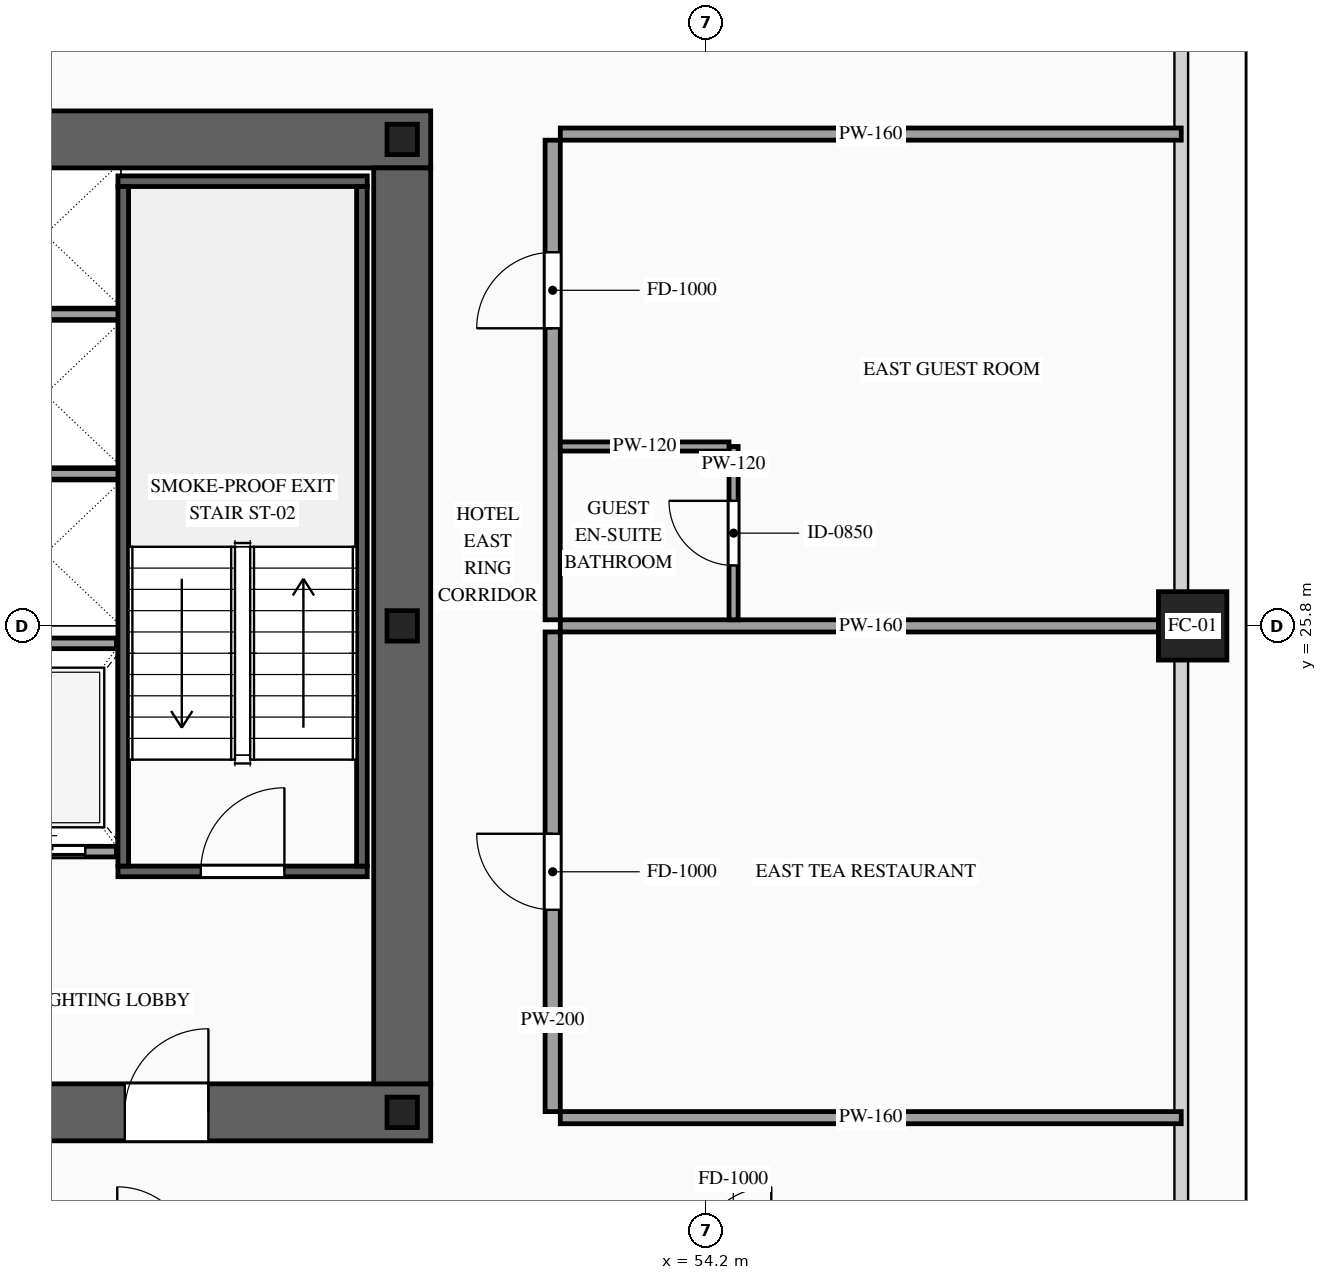
"""IFC4 building model, lengths in metres.
Left out: names, types, materials, properties, quantities, classifications, styles, units other than length and angle.
Written with IfcOpenShell. Run it as: python <this file> out.ifc"""

import sys

from ifc_helpers import new_model, si_unit, direction, frame, frame_2d, origin, origin_2d, place, context, subcontext, project, spatial, rectangle, hollow_rectangle, i_section, extrude, source, transform, mapped, element, fill, save


model = new_model("IFC4")
c1 = context("Model", 3, precision=1e-05, world=origin(), true_north=direction((0.0, 1.0)))
c2 = subcontext(c1, "Body", "Model", "MODEL_VIEW")
j1 = project(units=[si_unit("LENGTHUNIT", "METRE"), si_unit("PLANEANGLEUNIT", "RADIAN")], contexts=[c1])
p1 = place(None, origin())
s1 = spatial("IfcSite", under=j1, at=p1, CompositionType="ELEMENT")
p2 = place(p1, origin())
s2 = spatial("IfcBuilding", under=s1, at=p2, CompositionType="ELEMENT")
p3 = place(p2, frame((0.0, 0.0, 152.4)))
s3 = spatial("IfcBuildingStorey", under=s2, at=p3, CompositionType="ELEMENT", Elevation=152.4)
p4 = place(p3, frame((23.425, 19.4, 0.0), z_axis=(0.0, 0.0, 1.0), x_axis=(1.0, 0.0, 0.0)))
e1 = element("IfcWall", 1, at=p4, inside=s3, PredefinedType="SHEAR", context=c2, shape_type="SweptSolid", body=[
    extrude(rectangle(XDim=27.15, YDim=0.75, at=frame_2d((13.575, 0.0))), origin(), (0.0, 0.0, 1.0), 3.6),
])
p5 = place(p4, frame((2.025, 0.0, 0.0)))
e2 = element("IfcOpeningElement", 2, at=p5, cuts=e1, PredefinedType="OPENING", context=c2, shape_type="SweptSolid", body=[
    extrude(rectangle(XDim=1.1, YDim=2.2, at=frame_2d((0.55, 1.1))), frame((0.0, 0.39, 0.0), z_axis=(0.0, -1.0, 0.0), x_axis=(1.0, 0.0, 0.0)), (0.0, 0.0, 1.0), 0.78),
])
p6 = place(p4, frame((9.925, 0.0, 0.0)))
e3 = element("IfcOpeningElement", 3, at=p6, cuts=e1, PredefinedType="OPENING", context=c2, shape_type="SweptSolid", body=[
    extrude(rectangle(XDim=1.1, YDim=2.2, at=frame_2d((0.55, 1.1))), frame((0.0, 0.39, 0.0), z_axis=(0.0, -1.0, 0.0), x_axis=(1.0, 0.0, 0.0)), (0.0, 0.0, 1.0), 0.78),
])
p7 = place(p4, frame((23.125, 0.0, 0.0)))
e4 = element("IfcOpeningElement", 4, at=p7, cuts=e1, PredefinedType="OPENING", context=c2, shape_type="SweptSolid", body=[
    extrude(rectangle(XDim=1.1, YDim=2.2, at=frame_2d((0.55, 1.1))), frame((0.0, 0.39, 0.0), z_axis=(0.0, -1.0, 0.0), x_axis=(1.0, 0.0, 0.0)), (0.0, 0.0, 1.0), 0.78),
])
p8 = place(p4, frame((19.745, 0.0, 0.0)))
e5 = element("IfcOpeningElement", 5, at=p8, cuts=e1, PredefinedType="OPENING", context=c2, shape_type="SweptSolid", body=[
    extrude(rectangle(XDim=0.9, YDim=2.15, at=frame_2d((0.45, 1.075))), frame((0.0, 0.39, 0.0), z_axis=(0.0, -1.0, 0.0), x_axis=(1.0, 0.0, 0.0)), (0.0, 0.0, 1.0), 0.78),
])
p9 = place(p4, frame((18.305, 0.0, 0.0)))
e6 = element("IfcOpeningElement", 6, at=p9, cuts=e1, PredefinedType="OPENING", context=c2, shape_type="SweptSolid", body=[
    extrude(rectangle(XDim=0.9, YDim=2.15, at=frame_2d((0.45, 1.075))), frame((0.0, 0.39, 0.0), z_axis=(0.0, -1.0, 0.0), x_axis=(1.0, 0.0, 0.0)), (0.0, 0.0, 1.0), 0.78),
])
p10 = place(p3, frame((23.425, 32.2, 0.0), z_axis=(0.0, 0.0, 1.0), x_axis=(1.0, 0.0, 0.0)))
e7 = element("IfcWall", 7, at=p10, inside=s3, PredefinedType="SHEAR", context=c2, shape_type="SweptSolid", body=[
    extrude(rectangle(XDim=27.15, YDim=0.75, at=frame_2d((13.575, 0.0))), origin(), (0.0, 0.0, 1.0), 3.6),
])
p11 = place(p10, frame((4.645, 0.0, 0.0)))
e8 = element("IfcOpeningElement", 8, at=p11, cuts=e7, PredefinedType="OPENING", context=c2, shape_type="SweptSolid", body=[
    extrude(rectangle(XDim=0.9, YDim=2.15, at=frame_2d((0.45, 1.075))), frame((0.0, 0.39, 0.0), z_axis=(0.0, -1.0, 0.0), x_axis=(1.0, 0.0, 0.0)), (0.0, 0.0, 1.0), 0.78),
])
p12 = place(p10, frame((9.925, 0.0, 0.0)))
e9 = element("IfcOpeningElement", 9, at=p12, cuts=e7, PredefinedType="OPENING", context=c2, shape_type="SweptSolid", body=[
    extrude(rectangle(XDim=1.1, YDim=2.2, at=frame_2d((0.55, 1.1))), frame((0.0, 0.39, 0.0), z_axis=(0.0, -1.0, 0.0), x_axis=(1.0, 0.0, 0.0)), (0.0, 0.0, 1.0), 0.78),
])
p13 = place(p10, frame((15.775, 0.0, 0.0)))
e10 = element("IfcOpeningElement", 10, at=p13, cuts=e7, PredefinedType="OPENING", context=c2, shape_type="SweptSolid", body=[
    extrude(rectangle(XDim=1.1, YDim=2.2, at=frame_2d((0.55, 1.1))), frame((0.0, 0.39, 0.0), z_axis=(0.0, -1.0, 0.0), x_axis=(1.0, 0.0, 0.0)), (0.0, 0.0, 1.0), 0.78),
])
p14 = place(p10, frame((19.745, 0.0, 0.0)))
e11 = element("IfcOpeningElement", 11, at=p14, cuts=e7, PredefinedType="OPENING", context=c2, shape_type="SweptSolid", body=[
    extrude(rectangle(XDim=0.9, YDim=2.15, at=frame_2d((0.45, 1.075))), frame((0.0, 0.39, 0.0), z_axis=(0.0, -1.0, 0.0), x_axis=(1.0, 0.0, 0.0)), (0.0, 0.0, 1.0), 0.78),
])
m1 = source(origin(), c2, "Body", "SweptSolid", [
    extrude(rectangle(XDim=12.05, YDim=0.75, at=frame_2d((6.025, 0.0))), origin(), (0.0, 0.0, 1.0), 3.6),
])
p15 = place(p3, frame((50.2, 19.775, 0.0), z_axis=(0.0, 0.0, 1.0), x_axis=(0.0, 1.0, 0.0)))
e12 = element("IfcWall", 12, at=p15, inside=s3, PredefinedType="SHEAR", context=c2, shape_type="MappedRepresentation", body=[
    mapped(m1, transform((0.0, 0.0, 0.0), scale=1.0)),
])
m2 = source(origin(), c2, "Body", "SweptSolid", [
    extrude(i_section(OverallWidth=0.4, OverallDepth=0.4, WebThickness=0.013, FlangeThickness=0.021, at=origin_2d()), origin(), (0.0, 0.0, 1.0), 3.6),
])
for number, where, z_axis, x_axis in (
    (13, (50.2, 19.4, 0.0), (0.0, 0.0, 1.0), (1.0, 0.0, 0.0)),
    (14, (50.2, 25.8, 0.0), (0.0, 0.0, 1.0), (1.0, 0.0, 0.0)),
    (15, (50.2, 32.2, 0.0), (0.0, 0.0, 1.0), (1.0, 0.0, 0.0)),
):
    element("IfcColumn", number, at=place(p3, frame(where, z_axis=z_axis, x_axis=x_axis)), inside=s3, PredefinedType="COLUMN", context=c2, shape_type="MappedRepresentation", body=[
        mapped(m2, transform((0.0, 0.0, 0.0), scale=1.0)),
    ])
m3 = source(origin(), c2, "Body", "SweptSolid", [
    extrude(hollow_rectangle(XDim=0.9, YDim=0.9, WallThickness=0.042, at=origin_2d()), origin(), (0.0, 0.0, 1.0), 3.6),
])
p16 = place(p3, frame((60.6, 25.8, 0.0), z_axis=(0.0, 0.0, 1.0), x_axis=(1.0, 0.0, 0.0)))
e16 = element("IfcColumn", 16, at=p16, inside=s3, PredefinedType="COLUMN", context=c2, shape_type="MappedRepresentation", body=[
    mapped(m3, transform((0.0, 0.0, 0.0), scale=1.0)),
])
p17 = place(p3, frame((44.52, 22.83, 0.0), z_axis=(0.0, 0.0, 1.0), x_axis=(1.0, 0.0, 0.0)))
e17 = element("IfcWall", 17, at=p17, inside=s3, PredefinedType="SOLIDWALL", context=c2, shape_type="SweptSolid", body=[
    extrude(rectangle(XDim=1.92, YDim=0.14, at=frame_2d((0.96, 0.0))), origin(), (0.0, 0.0, 1.0), 3.38),
])
p18 = place(p17, frame((0.41, 0.0, 0.0)))
e18 = element("IfcOpeningElement", 18, at=p18, cuts=e17, PredefinedType="OPENING", context=c2, shape_type="SweptSolid", body=[
    extrude(rectangle(XDim=1.1, YDim=2.2, at=frame_2d((0.55, 1.1))), frame((0.0, 0.085, 0.0), z_axis=(0.0, -1.0, 0.0), x_axis=(1.0, 0.0, 0.0)), (0.0, 0.0, 1.0), 0.17),
])
m4 = source(origin(), c2, "Body", "SweptSolid", [
    extrude(rectangle(XDim=1.92, YDim=0.14, at=frame_2d((0.96, 0.0))), origin(), (0.0, 0.0, 1.0), 3.38),
])
p19 = place(p3, frame((44.52, 25.57, 0.0), z_axis=(0.0, 0.0, 1.0), x_axis=(1.0, 0.0, 0.0)))
e19 = element("IfcWall", 19, at=p19, inside=s3, PredefinedType="SOLIDWALL", context=c2, shape_type="MappedRepresentation", body=[
    mapped(m4, transform((0.0, 0.0, 0.0), scale=1.0)),
])
m5 = source(origin(), c2, "Body", "SweptSolid", [
    extrude(rectangle(XDim=2.0, YDim=0.14, at=frame_2d((1.0, 0.0))), origin(), (0.0, 0.0, 1.0), 3.38),
])
for number, where, z_axis, x_axis in (
    (20, (44.5, 27.8, 0.0), (0.0, 0.0, 1.0), (1.0, 0.0, 0.0)),
    (21, (44.5, 29.9, 0.0), (0.0, 0.0, 1.0), (1.0, 0.0, 0.0)),
):
    element("IfcWall", number, at=place(p3, frame(where, z_axis=z_axis, x_axis=x_axis)), inside=s3, PredefinedType="SOLIDWALL", context=c2, shape_type="MappedRepresentation", body=[
        mapped(m5, transform((0.0, 0.0, 0.0), scale=1.0)),
    ])
p20 = place(p3, frame((46.46, 22.57, 0.0), z_axis=(0.0, 0.0, 1.0), x_axis=(1.0, 0.0, 0.0)))
e22 = element("IfcWall", 22, at=p20, inside=s3, PredefinedType="SOLIDWALL", context=c2, shape_type="SweptSolid", body=[
    extrude(rectangle(XDim=3.28, YDim=0.14, at=frame_2d((1.64, 0.0))), origin(), (0.0, 0.0, 1.0), 3.38),
])
p21 = place(p20, frame((1.09, 0.0, 0.0)))
e23 = element("IfcOpeningElement", 23, at=p21, cuts=e22, PredefinedType="OPENING", context=c2, shape_type="SweptSolid", body=[
    extrude(rectangle(XDim=1.1, YDim=2.2, at=frame_2d((0.55, 1.1))), frame((0.0, 0.085, 0.0), z_axis=(0.0, -1.0, 0.0), x_axis=(1.0, 0.0, 0.0)), (0.0, 0.0, 1.0), 0.17),
])
m6 = source(origin(), c2, "Body", "SweptSolid", [
    extrude(rectangle(XDim=3.28, YDim=0.14, at=frame_2d((1.64, 0.0))), origin(), (0.0, 0.0, 1.0), 3.38),
])
p22 = place(p3, frame((46.46, 31.65, 0.0), z_axis=(0.0, 0.0, 1.0), x_axis=(1.0, 0.0, 0.0)))
e24 = element("IfcWall", 24, at=p22, inside=s3, PredefinedType="SOLIDWALL", context=c2, shape_type="MappedRepresentation", body=[
    mapped(m6, transform((0.0, 0.0, 0.0), scale=1.0)),
])
m7 = source(origin(), c2, "Body", "SweptSolid", [
    extrude(rectangle(XDim=8.94, YDim=0.14, at=frame_2d((4.47, 0.0))), origin(), (0.0, 0.0, 1.0), 3.38),
])
for number, where, z_axis, x_axis in (
    (25, (46.53, 22.64, 0.0), (0.0, 0.0, 1.0), (0.0, 1.0, 0.0)),
    (26, (49.67, 22.64, 0.0), (0.0, 0.0, 1.0), (0.0, 1.0, 0.0)),
):
    element("IfcWall", number, at=place(p3, frame(where, z_axis=z_axis, x_axis=x_axis)), inside=s3, PredefinedType="SOLIDWALL", context=c2, shape_type="MappedRepresentation", body=[
        mapped(m7, transform((0.0, 0.0, 0.0), scale=1.0)),
    ])
p23 = place(p3, frame((52.18, 19.41, 0.0), z_axis=(0.0, 0.0, 1.0), x_axis=(0.0, 1.0, 0.0)))
e27 = element("IfcWall", 27, at=p23, inside=s3, PredefinedType="PARTITIONING", context=c2, shape_type="SweptSolid", body=[
    extrude(rectangle(XDim=6.31, YDim=0.2, at=frame_2d((3.155, 0.0))), origin(), (0.0, 0.0, 1.0), 3.38),
])
p24 = place(p23, frame((2.655, 0.0, 0.0)))
e28 = element("IfcOpeningElement", 28, at=p24, cuts=e27, PredefinedType="OPENING", context=c2, shape_type="SweptSolid", body=[
    extrude(rectangle(XDim=1.0, YDim=2.2, at=frame_2d((0.5, 1.1))), frame((0.0, 0.115, 0.0), z_axis=(0.0, -1.0, 0.0), x_axis=(1.0, 0.0, 0.0)), (0.0, 0.0, 1.0), 0.23),
])
m8 = source(origin(), c2, "Body", "SweptSolid", [
    extrude(rectangle(XDim=8.17, YDim=0.16, at=frame_2d((4.085, 0.0))), origin(), (0.0, 0.0, 1.0), 2.675),
])
p25 = place(p3, frame((52.28, 25.8, 0.0), z_axis=(0.0, 0.0, 1.0), x_axis=(1.0, 0.0, 0.0)))
e29 = element("IfcWall", 29, at=p25, inside=s3, PredefinedType="PARTITIONING", context=c2, shape_type="MappedRepresentation", body=[
    mapped(m8, transform((0.0, 0.0, 0.0), scale=1.0)),
])
m9 = source(origin(), c2, "Body", "SweptSolid", [
    extrude(rectangle(XDim=8.17, YDim=0.16, at=frame_2d((4.085, 0.0))), origin(), (0.0, 0.0, 1.0), 2.875),
])
p26 = place(p3, frame((52.28, 19.33, 0.0), z_axis=(0.0, 0.0, 1.0), x_axis=(1.0, 0.0, 0.0)))
e30 = element("IfcWall", 30, at=p26, inside=s3, PredefinedType="PARTITIONING", context=c2, shape_type="MappedRepresentation", body=[
    mapped(m9, transform((0.0, 0.0, 0.0), scale=1.0)),
])
p27 = place(p3, frame((52.18, 25.88, 0.0), z_axis=(0.0, 0.0, 1.0), x_axis=(0.0, 1.0, 0.0)))
e31 = element("IfcWall", 31, at=p27, inside=s3, PredefinedType="PARTITIONING", context=c2, shape_type="SweptSolid", body=[
    extrude(rectangle(XDim=6.31, YDim=0.2, at=frame_2d((3.155, 0.0))), origin(), (0.0, 0.0, 1.0), 3.38),
])
p28 = place(p27, frame((3.835, 0.0, 0.0)))
e32 = element("IfcOpeningElement", 32, at=p28, cuts=e31, PredefinedType="OPENING", context=c2, shape_type="SweptSolid", body=[
    extrude(rectangle(XDim=1.0, YDim=2.2, at=frame_2d((0.5, 1.1))), frame((0.0, 0.115, 0.0), z_axis=(0.0, -1.0, 0.0), x_axis=(1.0, 0.0, 0.0)), (0.0, 0.0, 1.0), 0.23),
])
p29 = place(p3, frame((52.28, 32.27, 0.0), z_axis=(0.0, 0.0, 1.0), x_axis=(1.0, 0.0, 0.0)))
e33 = element("IfcWall", 33, at=p29, inside=s3, PredefinedType="PARTITIONING", context=c2, shape_type="MappedRepresentation", body=[
    mapped(m9, transform((0.0, 0.0, 0.0), scale=1.0)),
])
p30 = place(p3, frame((54.56, 25.88, 0.0), z_axis=(0.0, 0.0, 1.0), x_axis=(0.0, 1.0, 0.0)))
e34 = element("IfcWall", 34, at=p30, inside=s3, PredefinedType="PARTITIONING", context=c2, shape_type="SweptSolid", body=[
    extrude(rectangle(XDim=2.28, YDim=0.12, at=frame_2d((1.14, 0.0))), origin(), (0.0, 0.0, 1.0), 3.38),
])
p31 = place(p30, frame((0.715, 0.0, 0.0)))
e35 = element("IfcOpeningElement", 35, at=p31, cuts=e34, PredefinedType="OPENING", context=c2, shape_type="SweptSolid", body=[
    extrude(rectangle(XDim=0.85, YDim=2.1, at=frame_2d((0.425, 1.05))), frame((0.0, 0.075, 0.0), z_axis=(0.0, -1.0, 0.0), x_axis=(1.0, 0.0, 0.0)), (0.0, 0.0, 1.0), 0.15),
])
m10 = source(origin(), c2, "Body", "SweptSolid", [
    extrude(rectangle(XDim=2.22, YDim=0.12, at=frame_2d((1.11, 0.0))), origin(), (0.0, 0.0, 1.0), 3.38),
])
p32 = place(p3, frame((52.28, 28.16, 0.0), z_axis=(0.0, 0.0, 1.0), x_axis=(1.0, 0.0, 0.0)))
e36 = element("IfcWall", 36, at=p32, inside=s3, PredefinedType="PARTITIONING", context=c2, shape_type="MappedRepresentation", body=[
    mapped(m10, transform((0.0, 0.0, 0.0), scale=1.0)),
])
m11 = source(origin(), c2, "Body", "SweptSolid", [
    extrude(rectangle(XDim=1.1, YDim=2.2, at=frame_2d((0.55, 1.1))), frame((0.0, 0.025, 0.0), z_axis=(0.0, -1.0, 0.0), x_axis=(1.0, 0.0, 0.0)), (0.0, 0.0, 1.0), 0.05),
])
p33 = place(p18, origin())
e37 = element("IfcDoor", 37, at=p33, inside=s3, OperationType="SLIDING_TO_RIGHT", PredefinedType="DOOR", context=c2, shape_type="MappedRepresentation", body=[
    mapped(m11, transform((0.0, 0.0, 0.0), scale=1.0)),
])
fill(e18, e37)
m12 = source(origin(), c2, "Body", "SweptSolid", [
    extrude(rectangle(XDim=1.1, YDim=2.2, at=frame_2d((0.55, 1.1))), frame((0.0, 0.025, 0.0), z_axis=(0.0, -1.0, 0.0), x_axis=(1.0, 0.0, 0.0)), (0.0, 0.0, 1.0), 0.05),
])
p34 = place(p21, origin())
e38 = element("IfcDoor", 38, at=p34, inside=s3, OperationType="SINGLE_SWING_RIGHT", PredefinedType="DOOR", context=c2, shape_type="MappedRepresentation", body=[
    mapped(m12, transform((0.0, 0.0, 0.0), scale=1.0)),
])
fill(e23, e38)
p35 = place(p7, origin())
e39 = element("IfcDoor", 39, at=p35, inside=s3, OperationType="SINGLE_SWING_RIGHT", PredefinedType="DOOR", context=c2, shape_type="MappedRepresentation", body=[
    mapped(m12, transform((0.0, 0.0, 0.0), scale=1.0)),
])
fill(e4, e39)
m13 = source(origin(), c2, "Body", "SweptSolid", [
    extrude(rectangle(XDim=1.0, YDim=2.2, at=frame_2d((0.5, 1.1))), frame((0.0, 0.025, 0.0), z_axis=(0.0, -1.0, 0.0), x_axis=(1.0, 0.0, 0.0)), (0.0, 0.0, 1.0), 0.05),
])
p36 = place(p24, origin())
e40 = element("IfcDoor", 40, at=p36, inside=s3, OperationType="SINGLE_SWING_RIGHT", PredefinedType="DOOR", context=c2, shape_type="MappedRepresentation", body=[
    mapped(m13, transform((0.0, 0.0, 0.0), scale=1.0)),
])
fill(e28, e40)
p37 = place(p28, origin())
e41 = element("IfcDoor", 41, at=p37, inside=s3, OperationType="SINGLE_SWING_LEFT", PredefinedType="DOOR", context=c2, shape_type="MappedRepresentation", body=[
    mapped(m13, transform((0.0, 0.0, 0.0), scale=1.0)),
])
fill(e32, e41)
m14 = source(origin(), c2, "Body", "SweptSolid", [
    extrude(rectangle(XDim=0.85, YDim=2.1, at=frame_2d((0.425, 1.05))), frame((0.0, 0.025, 0.0), z_axis=(0.0, -1.0, 0.0), x_axis=(1.0, 0.0, 0.0)), (0.0, 0.0, 1.0), 0.05),
])
p38 = place(p31, origin())
e42 = element("IfcDoor", 42, at=p38, inside=s3, OperationType="SINGLE_SWING_RIGHT", PredefinedType="DOOR", context=c2, shape_type="MappedRepresentation", body=[
    mapped(m14, transform((0.0, 0.0, 0.0), scale=1.0)),
])
fill(e35, e42)
save(model, sys.argv[1])
